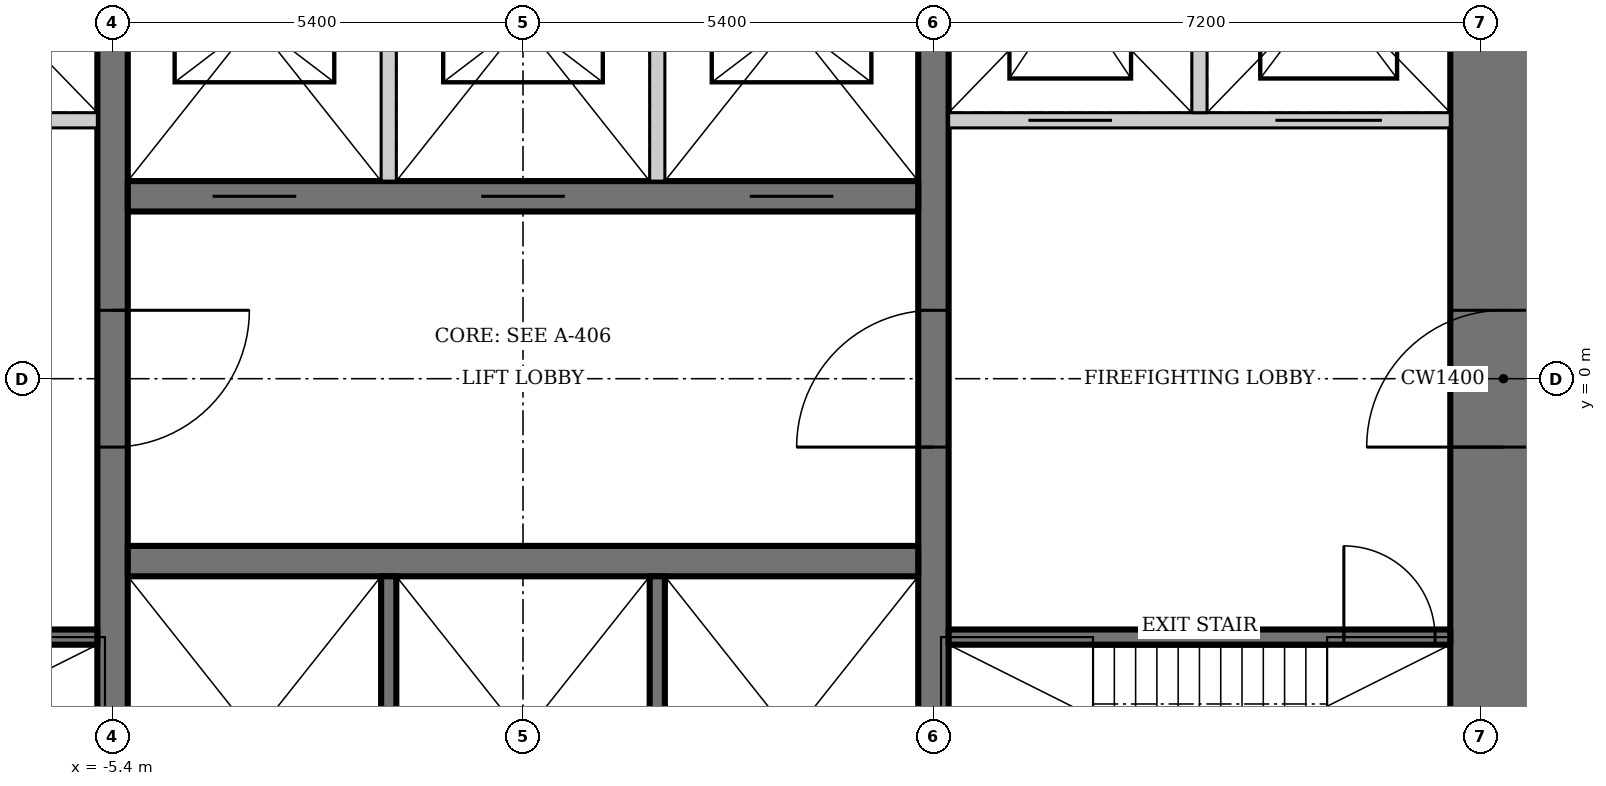
"""IFC4 building model, lengths in metres.
Left out: names, types, materials, properties, quantities, classifications, styles, units other than length and angle.
Written with IfcOpenShell. Run it as: python <this file> out.ifc"""

import sys

from ifc_helpers import new_model, si_unit, direction, frame, frame_2d, origin, place, context, subcontext, project, spatial, rectangle, extrude, element, fill, save


model = new_model("IFC4")
c1 = context("Model", 3, precision=1e-05, world=origin(), true_north=direction((0.0, 1.0)))
c2 = subcontext(c1, "Body", "Model", "MODEL_VIEW")
j1 = project(units=[si_unit("LENGTHUNIT", "METRE"), si_unit("PLANEANGLEUNIT", "RADIAN")], contexts=[c1])
p1 = place(None, origin())
s1 = spatial("IfcSite", under=j1, at=p1, CompositionType="ELEMENT")
p2 = place(p1, origin())
s2 = spatial("IfcBuilding", under=s1, at=p2, CompositionType="ELEMENT")
p3 = place(p2, frame((0.0, 0.0, 125.8)))
s3 = spatial("IfcBuildingStorey", under=s2, at=p3, CompositionType="ELEMENT", Elevation=125.8)
p4 = place(p3, frame((12.9, -13.0, 0.0), z_axis=(0.0, 0.0, 1.0), x_axis=(0.0, 1.0, 0.0)))
e1 = element("IfcWall", 1, at=p4, inside=s3, PredefinedType="SHEAR", context=c2, shape_type="SweptSolid", body=[
    extrude(rectangle(XDim=26.0, YDim=1.4, at=frame_2d((13.0, 0.0))), origin(), (0.0, 0.0, 1.0), 4.2),
])
p5 = place(p4, frame((12.1, 0.0, 0.0)))
e2 = element("IfcOpeningElement", 2, at=p5, cuts=e1, PredefinedType="OPENING", context=c2, shape_type="SweptSolid", body=[
    extrude(rectangle(XDim=1.8, YDim=2.1, at=frame_2d((0.9, 1.05))), frame((0.0, 0.71, 0.0), z_axis=(0.0, -1.0, 0.0), x_axis=(1.0, 0.0, 0.0)), (0.0, 0.0, 1.0), 1.42),
])
p6 = place(p3, frame((5.4, -6.8, 0.0), z_axis=(0.0, 0.0, 1.0), x_axis=(0.0, 1.0, 0.0)))
e3 = element("IfcWall", 3, at=p6, inside=s3, PredefinedType="SHEAR", context=c2, shape_type="SweptSolid", body=[
    extrude(rectangle(XDim=13.6, YDim=0.4, at=frame_2d((6.8, 0.0))), origin(), (0.0, 0.0, 1.0), 4.2),
])
p7 = place(p6, frame((5.9, 0.0, 0.0)))
e4 = element("IfcOpeningElement", 4, at=p7, cuts=e3, PredefinedType="OPENING", context=c2, shape_type="SweptSolid", body=[
    extrude(rectangle(XDim=1.8, YDim=2.1, at=frame_2d((0.9, 1.05))), frame((0.0, 0.21, 0.0), z_axis=(0.0, -1.0, 0.0), x_axis=(1.0, 0.0, 0.0)), (0.0, 0.0, 1.0), 0.42),
])
p8 = place(p3, frame((-5.4, 6.8, 0.0), z_axis=(0.0, 0.0, 1.0), x_axis=(0.0, -1.0, 0.0)))
e5 = element("IfcWall", 5, at=p8, inside=s3, PredefinedType="SHEAR", context=c2, shape_type="SweptSolid", body=[
    extrude(rectangle(XDim=13.6, YDim=0.4, at=frame_2d((6.8, 0.0))), origin(), (0.0, 0.0, 1.0), 4.2),
])
p9 = place(p8, frame((5.9, 0.0, 0.0)))
e6 = element("IfcOpeningElement", 6, at=p9, cuts=e5, PredefinedType="OPENING", context=c2, shape_type="SweptSolid", body=[
    extrude(rectangle(XDim=1.8, YDim=2.1, at=frame_2d((0.9, 1.05))), frame((0.0, 0.21, 0.0), z_axis=(0.0, -1.0, 0.0), x_axis=(1.0, 0.0, 0.0)), (0.0, 0.0, 1.0), 0.42),
])
p10 = place(p3, frame((-5.2, -2.4, 0.0), z_axis=(0.0, 0.0, 1.0), x_axis=(1.0, 0.0, 0.0)))
e7 = element("IfcWall", 7, at=p10, inside=s3, PredefinedType="SHEAR", context=c2, shape_type="SweptSolid", body=[
    extrude(rectangle(XDim=10.4, YDim=0.4, at=frame_2d((5.2, 0.0))), origin(), (0.0, 0.0, 1.0), 4.2),
])
for number, where, z_axis, x_axis in (
    (8, (-1.767, -2.6, 0.0), (0.0, 0.0, 1.0), (0.0, -1.0, 0.0)),
    (9, (1.767, -2.6, 0.0), (0.0, 0.0, 1.0), (0.0, -1.0, 0.0)),
):
    element("IfcWall", number, at=place(p3, frame(where, z_axis=z_axis, x_axis=x_axis)), inside=s3, PredefinedType="SOLIDWALL", context=c2, shape_type="SweptSolid", body=[
        extrude(rectangle(XDim=4.2, YDim=0.2, at=frame_2d((2.1, 0.0))), origin(), (0.0, 0.0, 1.0), 4.2),
    ])
p11 = place(p3, frame((5.2, 2.4, 0.0), z_axis=(0.0, 0.0, 1.0), x_axis=(-1.0, 0.0, 0.0)))
e10 = element("IfcWall", 10, at=p11, inside=s3, PredefinedType="SHEAR", context=c2, shape_type="SweptSolid", body=[
    extrude(rectangle(XDim=10.4, YDim=0.4, at=frame_2d((5.2, 0.0))), origin(), (0.0, 0.0, 1.0), 4.2),
])
p12 = place(p11, frame((8.183, 0.0, 0.0)))
e11 = element("IfcOpeningElement", 11, at=p12, cuts=e10, PredefinedType="OPENING", context=c2, shape_type="SweptSolid", body=[
    extrude(rectangle(XDim=1.1, YDim=2.2, at=frame_2d((0.55, 1.1))), frame((0.0, 0.21, 0.0), z_axis=(0.0, -1.0, 0.0), x_axis=(1.0, 0.0, 0.0)), (0.0, 0.0, 1.0), 0.42),
])
p13 = place(p11, frame((4.65, 0.0, 0.0)))
e12 = element("IfcOpeningElement", 12, at=p13, cuts=e10, PredefinedType="OPENING", context=c2, shape_type="SweptSolid", body=[
    extrude(rectangle(XDim=1.1, YDim=2.2, at=frame_2d((0.55, 1.1))), frame((0.0, 0.21, 0.0), z_axis=(0.0, -1.0, 0.0), x_axis=(1.0, 0.0, 0.0)), (0.0, 0.0, 1.0), 0.42),
])
p14 = place(p11, frame((1.117, 0.0, 0.0)))
e13 = element("IfcOpeningElement", 13, at=p14, cuts=e10, PredefinedType="OPENING", context=c2, shape_type="SweptSolid", body=[
    extrude(rectangle(XDim=1.1, YDim=2.2, at=frame_2d((0.55, 1.1))), frame((0.0, 0.21, 0.0), z_axis=(0.0, -1.0, 0.0), x_axis=(1.0, 0.0, 0.0)), (0.0, 0.0, 1.0), 0.42),
])
for number, where, z_axis, x_axis in (
    (14, (-1.767, 2.6, 0.0), (0.0, 0.0, 1.0), (0.0, 1.0, 0.0)),
    (15, (1.767, 2.6, 0.0), (0.0, 0.0, 1.0), (0.0, 1.0, 0.0)),
):
    element("IfcWall", number, at=place(p3, frame(where, z_axis=z_axis, x_axis=x_axis)), inside=s3, PredefinedType="SOLIDWALL", context=c2, shape_type="SweptSolid", body=[
        extrude(rectangle(XDim=4.2, YDim=0.2, at=frame_2d((2.1, 0.0))), origin(), (0.0, 0.0, 1.0), 4.2),
    ])
p15 = place(p3, frame((5.6, -3.4, 0.0), z_axis=(0.0, 0.0, 1.0), x_axis=(1.0, 0.0, 0.0)))
e16 = element("IfcWall", 16, at=p15, inside=s3, PredefinedType="SHEAR", context=c2, shape_type="SweptSolid", body=[
    extrude(rectangle(XDim=6.6, YDim=0.2, at=frame_2d((3.3, 0.0))), origin(), (0.0, 0.0, 1.0), 4.2),
])
p16 = place(p15, frame((5.2, 0.0, 0.0)))
e17 = element("IfcOpeningElement", 17, at=p16, cuts=e16, PredefinedType="OPENING", context=c2, shape_type="SweptSolid", body=[
    extrude(rectangle(XDim=1.2, YDim=2.1, at=frame_2d((0.6, 1.05))), frame((0.0, 0.11, 0.0), z_axis=(0.0, -1.0, 0.0), x_axis=(1.0, 0.0, 0.0)), (0.0, 0.0, 1.0), 0.22),
])
p17 = place(p3, frame((12.2, 3.4, 0.0), z_axis=(0.0, 0.0, 1.0), x_axis=(-1.0, 0.0, 0.0)))
e18 = element("IfcWall", 18, at=p17, inside=s3, PredefinedType="SOLIDWALL", context=c2, shape_type="SweptSolid", body=[
    extrude(rectangle(XDim=6.6, YDim=0.2, at=frame_2d((3.3, 0.0))), origin(), (0.0, 0.0, 1.0), 4.2),
])
p18 = place(p17, frame((4.45, 0.0, 0.0)))
e19 = element("IfcOpeningElement", 19, at=p18, cuts=e18, PredefinedType="OPENING", context=c2, shape_type="SweptSolid", body=[
    extrude(rectangle(XDim=1.1, YDim=2.2, at=frame_2d((0.55, 1.1))), frame((0.0, 0.11, 0.0), z_axis=(0.0, -1.0, 0.0), x_axis=(1.0, 0.0, 0.0)), (0.0, 0.0, 1.0), 0.22),
])
p19 = place(p17, frame((0.9, 0.0, 0.0)))
e20 = element("IfcOpeningElement", 20, at=p19, cuts=e18, PredefinedType="OPENING", context=c2, shape_type="SweptSolid", body=[
    extrude(rectangle(XDim=1.4, YDim=2.2, at=frame_2d((0.7, 1.1))), frame((0.0, 0.11, 0.0), z_axis=(0.0, -1.0, 0.0), x_axis=(1.0, 0.0, 0.0)), (0.0, 0.0, 1.0), 0.22),
])
p20 = place(p3, frame((8.9, 3.5, 0.0), z_axis=(0.0, 0.0, 1.0), x_axis=(0.0, 1.0, 0.0)))
e21 = element("IfcWall", 21, at=p20, inside=s3, PredefinedType="SOLIDWALL", context=c2, shape_type="SweptSolid", body=[
    extrude(rectangle(XDim=3.3, YDim=0.2, at=frame_2d((1.65, 0.0))), origin(), (0.0, 0.0, 1.0), 4.2),
])
p21 = place(p3, frame((-5.6, -3.4, 0.0), z_axis=(0.0, 0.0, 1.0), x_axis=(-1.0, 0.0, 0.0)))
e22 = element("IfcWall", 22, at=p21, inside=s3, PredefinedType="SHEAR", context=c2, shape_type="SweptSolid", body=[
    extrude(rectangle(XDim=6.6, YDim=0.2, at=frame_2d((3.3, 0.0))), origin(), (0.0, 0.0, 1.0), 4.2),
])
p22 = place(p21, frame((5.2, 0.0, 0.0)))
e23 = element("IfcOpeningElement", 23, at=p22, cuts=e22, PredefinedType="OPENING", context=c2, shape_type="SweptSolid", body=[
    extrude(rectangle(XDim=1.2, YDim=2.1, at=frame_2d((0.6, 1.05))), frame((0.0, 0.11, 0.0), z_axis=(0.0, -1.0, 0.0), x_axis=(1.0, 0.0, 0.0)), (0.0, 0.0, 1.0), 0.22),
])
p23 = place(p3, frame((-12.2, 3.4, 0.0), z_axis=(0.0, 0.0, 1.0), x_axis=(1.0, 0.0, 0.0)))
e24 = element("IfcWall", 24, at=p23, inside=s3, PredefinedType="SOLIDWALL", context=c2, shape_type="SweptSolid", body=[
    extrude(rectangle(XDim=6.6, YDim=0.2, at=frame_2d((3.3, 0.0))), origin(), (0.0, 0.0, 1.0), 4.2),
])
p24 = place(p23, frame((1.05, 0.0, 0.0)))
e25 = element("IfcOpeningElement", 25, at=p24, cuts=e24, PredefinedType="OPENING", context=c2, shape_type="SweptSolid", body=[
    extrude(rectangle(XDim=1.1, YDim=2.2, at=frame_2d((0.55, 1.1))), frame((0.0, 0.11, 0.0), z_axis=(0.0, -1.0, 0.0), x_axis=(1.0, 0.0, 0.0)), (0.0, 0.0, 1.0), 0.22),
])
p25 = place(p23, frame((4.3, 0.0, 0.0)))
e26 = element("IfcOpeningElement", 26, at=p25, cuts=e24, PredefinedType="OPENING", context=c2, shape_type="SweptSolid", body=[
    extrude(rectangle(XDim=1.4, YDim=2.2, at=frame_2d((0.7, 1.1))), frame((0.0, 0.11, 0.0), z_axis=(0.0, -1.0, 0.0), x_axis=(1.0, 0.0, 0.0)), (0.0, 0.0, 1.0), 0.22),
])
p26 = place(p7, origin())
e27 = element("IfcDoor", 27, at=p26, inside=s3, OperationType="DOUBLE_DOOR_DOUBLE_SWING", PredefinedType="DOOR", context=c2, shape_type="SweptSolid", body=[
    extrude(rectangle(XDim=1.8, YDim=2.1, at=frame_2d((0.9, 1.05))), frame((0.0, 0.025, 0.0), z_axis=(0.0, -1.0, 0.0), x_axis=(1.0, 0.0, 0.0)), (0.0, 0.0, 1.0), 0.05),
])
fill(e4, e27)
p27 = place(p9, origin())
e28 = element("IfcDoor", 28, at=p27, inside=s3, OperationType="DOUBLE_DOOR_DOUBLE_SWING", PredefinedType="DOOR", context=c2, shape_type="SweptSolid", body=[
    extrude(rectangle(XDim=1.8, YDim=2.1, at=frame_2d((0.9, 1.05))), frame((0.0, 0.025, 0.0), z_axis=(0.0, -1.0, 0.0), x_axis=(1.0, 0.0, 0.0)), (0.0, 0.0, 1.0), 0.05),
])
fill(e6, e28)
p28 = place(p16, origin())
e29 = element("IfcDoor", 29, at=p28, inside=s3, OperationType="SINGLE_SWING_RIGHT", PredefinedType="DOOR", context=c2, shape_type="SweptSolid", body=[
    extrude(rectangle(XDim=1.2, YDim=2.1, at=frame_2d((0.6, 1.05))), frame((0.0, 0.025, 0.0), z_axis=(0.0, -1.0, 0.0), x_axis=(1.0, 0.0, 0.0)), (0.0, 0.0, 1.0), 0.05),
])
fill(e17, e29)
p29 = place(p5, origin())
e30 = element("IfcDoor", 30, at=p29, inside=s3, OperationType="DOUBLE_DOOR_DOUBLE_SWING", PredefinedType="DOOR", context=c2, shape_type="SweptSolid", body=[
    extrude(rectangle(XDim=1.8, YDim=2.1, at=frame_2d((0.9, 1.05))), frame((0.0, 0.025, 0.0), z_axis=(0.0, -1.0, 0.0), x_axis=(1.0, 0.0, 0.0)), (0.0, 0.0, 1.0), 0.05),
])
fill(e2, e30)
p30 = place(p12, origin())
e31 = element("IfcDoor", 31, at=p30, inside=s3, OperationType="DOUBLE_DOOR_SLIDING", PredefinedType="DOOR", context=c2, shape_type="SweptSolid", body=[
    extrude(rectangle(XDim=1.1, YDim=2.2, at=frame_2d((0.55, 1.1))), frame((0.0, 0.025, 0.0), z_axis=(0.0, -1.0, 0.0), x_axis=(1.0, 0.0, 0.0)), (0.0, 0.0, 1.0), 0.05),
])
fill(e11, e31)
p31 = place(p13, origin())
e32 = element("IfcDoor", 32, at=p31, inside=s3, OperationType="DOUBLE_DOOR_SLIDING", PredefinedType="DOOR", context=c2, shape_type="SweptSolid", body=[
    extrude(rectangle(XDim=1.1, YDim=2.2, at=frame_2d((0.55, 1.1))), frame((0.0, 0.025, 0.0), z_axis=(0.0, -1.0, 0.0), x_axis=(1.0, 0.0, 0.0)), (0.0, 0.0, 1.0), 0.05),
])
fill(e12, e32)
p32 = place(p14, origin())
e33 = element("IfcDoor", 33, at=p32, inside=s3, OperationType="DOUBLE_DOOR_SLIDING", PredefinedType="DOOR", context=c2, shape_type="SweptSolid", body=[
    extrude(rectangle(XDim=1.1, YDim=2.2, at=frame_2d((0.55, 1.1))), frame((0.0, 0.025, 0.0), z_axis=(0.0, -1.0, 0.0), x_axis=(1.0, 0.0, 0.0)), (0.0, 0.0, 1.0), 0.05),
])
fill(e13, e33)
p33 = place(p18, origin())
e34 = element("IfcDoor", 34, at=p33, inside=s3, OperationType="DOUBLE_DOOR_SLIDING", PredefinedType="DOOR", context=c2, shape_type="SweptSolid", body=[
    extrude(rectangle(XDim=1.1, YDim=2.2, at=frame_2d((0.55, 1.1))), frame((0.0, 0.025, 0.0), z_axis=(0.0, -1.0, 0.0), x_axis=(1.0, 0.0, 0.0)), (0.0, 0.0, 1.0), 0.05),
])
fill(e19, e34)
p34 = place(p19, origin())
e35 = element("IfcDoor", 35, at=p34, inside=s3, OperationType="DOUBLE_DOOR_SLIDING", PredefinedType="DOOR", context=c2, shape_type="SweptSolid", body=[
    extrude(rectangle(XDim=1.4, YDim=2.2, at=frame_2d((0.7, 1.1))), frame((0.0, 0.025, 0.0), z_axis=(0.0, -1.0, 0.0), x_axis=(1.0, 0.0, 0.0)), (0.0, 0.0, 1.0), 0.05),
])
fill(e20, e35)
save(model, sys.argv[1])
